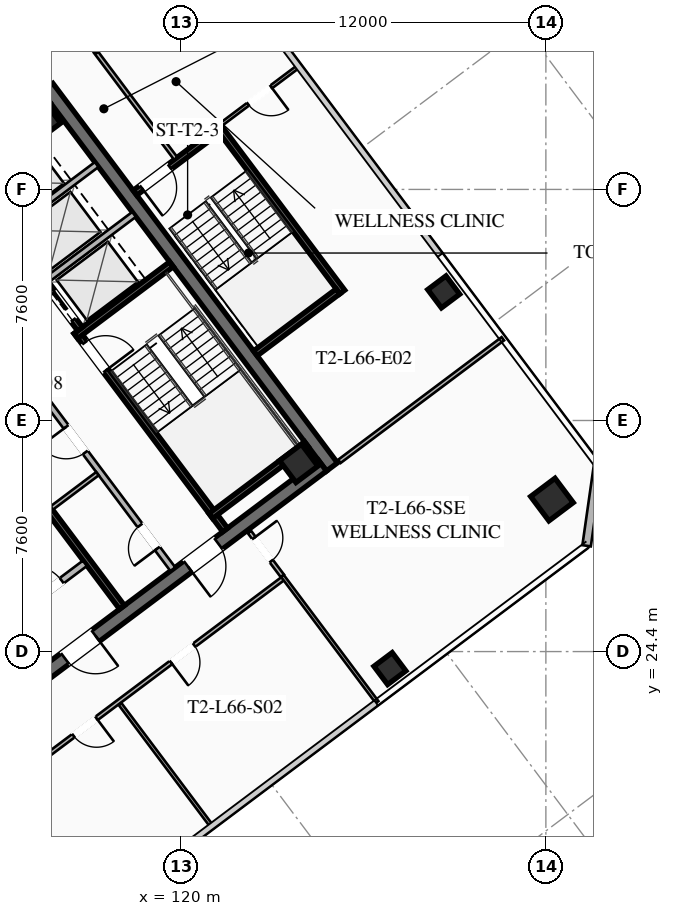
"""IFC4 building model, lengths in metres.
Left out: names, types, materials, properties, quantities, classifications, styles, units other than length and angle.
Written with IfcOpenShell. Run it as: python <this file> out.ifc"""

import sys

from ifc_helpers import new_model, si_unit, direction, frame, frame_2d, origin, origin_2d, place, context, subcontext, project, spatial, rectangle, hollow_rectangle, extrude, element, fill, save


model = new_model("IFC4")
c1 = context("Model", 3, precision=1e-05, world=origin(), true_north=direction((0.0, 1.0)))
c2 = subcontext(c1, "Body", "Model", "MODEL_VIEW")
j1 = project(units=[si_unit("LENGTHUNIT", "METRE"), si_unit("PLANEANGLEUNIT", "RADIAN")], contexts=[c1])
p1 = place(None, origin())
s1 = spatial("IfcSite", under=j1, at=p1, CompositionType="ELEMENT")
p2 = place(p1, origin())
s2 = spatial("IfcBuilding", under=s1, at=p2, CompositionType="ELEMENT")
p3 = place(p2, frame((0.0, 0.0, 243.25)))
s3 = spatial("IfcBuildingStorey", under=s2, at=p3, CompositionType="ELEMENT", Elevation=243.25)
p4 = place(p3, frame((115.604, 42.953, 0.0), z_axis=(0.0, 0.0, 1.0), x_axis=(0.600005007985, -0.799996243986, 0.0)))
e1 = element("IfcWall", 1, at=p4, inside=s3, PredefinedType="SHEAR", context=c2, shape_type="SweptSolid", body=[
    extrude(rectangle(XDim=15.6, YDim=0.45, at=frame_2d((7.8, 0.0))), origin(), (0.0, 0.0, 1.0), 3.55),
])
p5 = place(p3, frame((124.649, 30.518, 0.0), z_axis=(0.0, 0.0, 1.0), x_axis=(-0.8, -0.6, 0.0)))
e2 = element("IfcWall", 2, at=p5, inside=s3, PredefinedType="SHEAR", context=c2, shape_type="SweptSolid", body=[
    extrude(rectangle(XDim=15.26, YDim=0.45, at=frame_2d((7.63, 0.0))), origin(), (0.0, 0.0, 1.0), 3.55),
])
p6 = place(p5, frame((9.33, 0.0, 0.0)))
e3 = element("IfcOpeningElement", 3, at=p6, cuts=e2, PredefinedType="OPENING", context=c2, shape_type="SweptSolid", body=[
    extrude(rectangle(XDim=1.25, YDim=2.25, at=frame_2d((0.625, 1.125))), frame((0.0, 0.235, 0.0), z_axis=(0.0, -1.0, 0.0), x_axis=(1.0, 0.0, 0.0)), (0.0, 0.0, 1.0), 0.47),
])
p7 = place(p5, frame((4.28, 0.0, 0.0)))
e4 = element("IfcOpeningElement", 4, at=p7, cuts=e2, PredefinedType="OPENING", context=c2, shape_type="SweptSolid", body=[
    extrude(rectangle(XDim=1.25, YDim=2.25, at=frame_2d((0.625, 1.125))), frame((0.0, 0.235, 0.0), z_axis=(0.0, -1.0, 0.0), x_axis=(1.0, 0.0, 0.0)), (0.0, 0.0, 1.0), 0.47),
])
for number, where, z_axis, x_axis in (
    (5, (123.87, 30.59, 0.0), (0.0, 0.0, 1.0), (0.8, 0.6, 0.0)),
    (6, (115.41, 41.87, 0.0), (0.0, 0.0, 1.0), (0.8, 0.6, 0.0)),
):
    element("IfcColumn", number, at=place(p3, frame(where, z_axis=z_axis, x_axis=x_axis)), inside=s3, PredefinedType="COLUMN", context=c2, shape_type="SweptSolid", body=[
        extrude(hollow_rectangle(XDim=0.9, YDim=0.9, WallThickness=0.04, at=origin_2d()), origin(), (0.0, 0.0, 1.0), 3.25),
    ])
p8 = place(p3, frame((132.2, 29.4, 0.0), z_axis=(0.0, 0.0, 1.0), x_axis=(0.799999996291, 0.600000004945, 0.0)))
e7 = element("IfcColumn", 7, at=p8, inside=s3, PredefinedType="COLUMN", context=c2, shape_type="SweptSolid", body=[
    extrude(hollow_rectangle(XDim=1.0, YDim=1.0, WallThickness=0.04, at=origin_2d()), origin(), (0.0, 0.0, 1.0), 3.25),
])
for number, where, z_axis, x_axis in (
    (8, (126.87, 23.84, 0.0), (0.0, 0.0, 1.0), (0.8, 0.6, 0.0)),
    (9, (128.64, 36.23, 0.0), (0.0, 0.0, 1.0), (0.8, 0.6, 0.0)),
):
    element("IfcColumn", number, at=place(p3, frame(where, z_axis=z_axis, x_axis=x_axis)), inside=s3, PredefinedType="COLUMN", context=c2, shape_type="SweptSolid", body=[
        extrude(hollow_rectangle(XDim=0.75, YDim=0.75, WallThickness=0.032, at=origin_2d()), origin(), (0.0, 0.0, 1.0), 3.25),
    ])
p9 = place(p3, frame((133.72, 30.54, 0.0), z_axis=(0.0, 0.0, 1.0), x_axis=(-0.141370477216, -0.989956760759, 0.0)))
e10 = element("IfcWall", 10, at=p9, inside=s3, PredefinedType="SOLIDWALL", context=c2, shape_type="SweptSolid", body=[
    extrude(rectangle(XDim=2.687, YDim=0.28, at=frame_2d((1.344, 0.0))), origin(), (0.0, 0.0, 1.0), 3.25),
])
p10 = place(p3, frame((116.56, 34.92, 0.0), z_axis=(0.0, 0.0, 1.0), x_axis=(0.59999041401, -0.800007189403, 0.0)))
e11 = element("IfcWall", 11, at=p10, inside=s3, PredefinedType="SHEAR", context=c2, shape_type="SweptSolid", body=[
    extrude(rectangle(XDim=8.15, YDim=0.2, at=frame_2d((4.075, 0.0))), origin(), (0.0, 0.0, 1.0), 3.25),
])
p11 = place(p10, frame((0.45, 0.0, 0.0)))
e12 = element("IfcOpeningElement", 12, at=p11, cuts=e11, PredefinedType="OPENING", context=c2, shape_type="SweptSolid", body=[
    extrude(rectangle(XDim=1.15, YDim=2.2, at=frame_2d((0.575, 1.1))), frame((0.0, 0.11, 0.0), z_axis=(0.0, -1.0, 0.0), x_axis=(1.0, 0.0, 0.0)), (0.0, 0.0, 1.0), 0.22),
])
for number, where, z_axis, x_axis in (
    (13, (116.54, 34.78, 0.0), (0.0, 0.0, 1.0), (0.8, 0.6, 0.0)),
    (14, (120.98, 28.86, 0.0), (0.0, 0.0, 1.0), (0.8, 0.6, 0.0)),
):
    element("IfcWall", number, at=place(p3, frame(where, z_axis=z_axis, x_axis=x_axis)), inside=s3, PredefinedType="SHEAR", context=c2, shape_type="SweptSolid", body=[
        extrude(rectangle(XDim=3.93, YDim=0.2, at=frame_2d((1.965, 0.0))), origin(), (0.0, 0.0, 1.0), 3.25),
    ])
p12 = place(p3, frame((118.058, 25.856, 0.0), z_axis=(0.0, 0.0, 1.0), x_axis=(-0.600002657301, 0.799998007018, 0.0)))
e15 = element("IfcWall", 15, at=p12, inside=s3, PredefinedType="SHEAR", context=c2, shape_type="SweptSolid", body=[
    extrude(rectangle(XDim=14.7, YDim=0.2, at=frame_2d((7.35, 0.0))), origin(), (0.0, 0.0, 1.0), 3.25),
])
p13 = place(p3, frame((114.316, 25.412, 0.0), z_axis=(0.0, 0.0, 1.0), x_axis=(0.800018601094, 0.59997519774, 0.0)))
e16 = element("IfcWall", 16, at=p13, inside=s3, PredefinedType="SOLIDWALL", context=c2, shape_type="SweptSolid", body=[
    extrude(rectangle(XDim=3.15, YDim=0.22, at=frame_2d((1.575, 0.0))), origin(), (0.0, 0.0, 1.0), 2.393),
])
p14 = place(p13, frame((0.95, 0.0, 0.0)))
e17 = element("IfcOpeningElement", 17, at=p14, cuts=e16, PredefinedType="OPENING", context=c2, shape_type="SweptSolid", body=[
    extrude(rectangle(XDim=1.25, YDim=2.25, at=frame_2d((0.625, 1.125))), frame((0.0, 0.12, 0.0), z_axis=(0.0, -1.0, 0.0), x_axis=(1.0, 0.0, 0.0)), (0.0, 0.0, 1.0), 0.24),
])
p15 = place(p3, frame((112.75, 40.25, 0.0), z_axis=(0.0, 0.0, 1.0), x_axis=(0.599994036198, -0.800004472816, 0.0)))
e18 = element("IfcWall", 18, at=p15, inside=s3, PredefinedType="SHEAR", context=c2, shape_type="SweptSolid", body=[
    extrude(rectangle(XDim=6.55, YDim=0.2, at=frame_2d((3.275, 0.0))), origin(), (0.0, 0.0, 1.0), 3.25),
])
p16 = place(p15, frame((5.075, 0.0, 0.0)))
e19 = element("IfcOpeningElement", 19, at=p16, cuts=e18, PredefinedType="OPENING", context=c2, shape_type="SweptSolid", body=[
    extrude(rectangle(XDim=1.1, YDim=2.2, at=frame_2d((0.55, 1.1))), frame((0.0, 0.11, 0.0), z_axis=(0.0, -1.0, 0.0), x_axis=(1.0, 0.0, 0.0)), (0.0, 0.0, 1.0), 0.22),
])
p17 = place(p15, frame((3.025, 0.0, 0.0)))
e20 = element("IfcOpeningElement", 20, at=p17, cuts=e18, PredefinedType="OPENING", context=c2, shape_type="SweptSolid", body=[
    extrude(rectangle(XDim=1.1, YDim=2.2, at=frame_2d((0.55, 1.1))), frame((0.0, 0.11, 0.0), z_axis=(0.0, -1.0, 0.0), x_axis=(1.0, 0.0, 0.0)), (0.0, 0.0, 1.0), 0.22),
])
p18 = place(p15, frame((1.025, 0.0, 0.0)))
e21 = element("IfcOpeningElement", 21, at=p18, cuts=e18, PredefinedType="OPENING", context=c2, shape_type="SweptSolid", body=[
    extrude(rectangle(XDim=1.1, YDim=2.2, at=frame_2d((0.55, 1.1))), frame((0.0, 0.11, 0.0), z_axis=(0.0, -1.0, 0.0), x_axis=(1.0, 0.0, 0.0)), (0.0, 0.0, 1.0), 0.22),
])
for number, where, z_axis, x_axis in (
    (22, (115.59, 36.63, 0.0), (0.0, 0.0, 1.0), (0.8, 0.6, 0.0)),
    (23, (114.36, 38.27, 0.0), (0.0, 0.0, 1.0), (0.8, 0.6, 0.0)),
):
    element("IfcWall", number, at=place(p3, frame(where, z_axis=z_axis, x_axis=x_axis)), inside=s3, PredefinedType="SOLIDWALL", context=c2, shape_type="SweptSolid", body=[
        extrude(rectangle(XDim=3.58, YDim=0.2, at=frame_2d((1.79, 0.0))), origin(), (0.0, 0.0, 1.0), 3.25),
    ])
p19 = place(p3, frame((119.73, 27.11, 0.0), z_axis=(0.0, 0.0, 1.0), x_axis=(-0.600005580459, 0.799995814625, 0.0)))
e24 = element("IfcWall", 24, at=p19, inside=s3, PredefinedType="SOLIDWALL", context=c2, shape_type="SweptSolid", body=[
    extrude(rectangle(XDim=7.0, YDim=0.2, at=frame_2d((3.5, 0.0))), origin(), (0.0, 0.0, 1.0), 2.393),
])
p20 = place(p19, frame((0.85, 0.0, 0.0)))
e25 = element("IfcOpeningElement", 25, at=p20, cuts=e24, PredefinedType="OPENING", context=c2, shape_type="SweptSolid", body=[
    extrude(rectangle(XDim=0.95, YDim=2.05, at=frame_2d((0.475, 1.025))), frame((0.0, 0.11, 0.0), z_axis=(0.0, -1.0, 0.0), x_axis=(1.0, 0.0, 0.0)), (0.0, 0.0, 1.0), 0.22),
])
p21 = place(p19, frame((4.8, 0.0, 0.0)))
e26 = element("IfcOpeningElement", 26, at=p21, cuts=e24, PredefinedType="OPENING", context=c2, shape_type="SweptSolid", body=[
    extrude(rectangle(XDim=1.05, YDim=2.2, at=frame_2d((0.525, 1.1))), frame((0.0, 0.11, 0.0), z_axis=(0.0, -1.0, 0.0), x_axis=(1.0, 0.0, 0.0)), (0.0, 0.0, 1.0), 0.22),
])
p22 = place(p3, frame((115.746, 29.122, 0.0), z_axis=(0.0, 0.0, 1.0), x_axis=(0.8, 0.6, 0.0)))
e27 = element("IfcWall", 27, at=p22, inside=s3, PredefinedType="PARTITIONING", context=c2, shape_type="SweptSolid", body=[
    extrude(rectangle(XDim=1.88, YDim=0.135, at=frame_2d((0.94, 0.0))), origin(), (0.0, 0.0, 1.0), 2.393),
])
p23 = place(p3, frame((125.304, 36.228, 0.0), z_axis=(0.0, 0.0, 1.0), x_axis=(-0.59998851072, 0.800008616831, 0.0)))
e28 = element("IfcWall", 28, at=p23, inside=s3, PredefinedType="SHEAR", context=c2, shape_type="SweptSolid", body=[
    extrude(rectangle(XDim=6.8, YDim=0.2, at=frame_2d((3.4, 0.0))), origin(), (0.0, 0.0, 1.0), 3.25),
])
p24 = place(p3, frame((121.204, 41.528, 0.0), z_axis=(0.0, 0.0, 1.0), x_axis=(-0.800017232136, -0.599977023131, 0.0)))
e29 = element("IfcWall", 29, at=p24, inside=s3, PredefinedType="SHEAR", context=c2, shape_type="SweptSolid", body=[
    extrude(rectangle(XDim=3.4, YDim=0.2, at=frame_2d((1.7, 0.0))), origin(), (0.0, 0.0, 1.0), 3.25),
])
p25 = place(p24, frame((1.975, 0.0, 0.0)))
e30 = element("IfcOpeningElement", 30, at=p25, cuts=e29, PredefinedType="OPENING", context=c2, shape_type="SweptSolid", body=[
    extrude(rectangle(XDim=1.15, YDim=2.2, at=frame_2d((0.575, 1.1))), frame((0.0, 0.11, 0.0), z_axis=(0.0, -1.0, 0.0), x_axis=(1.0, 0.0, 0.0)), (0.0, 0.0, 1.0), 0.22),
])
p26 = place(p3, frame((122.444, 34.208, 0.0), z_axis=(0.0, 0.0, 1.0), x_axis=(0.79999138319, 0.600011488909, 0.0)))
e31 = element("IfcWall", 31, at=p26, inside=s3, PredefinedType="SHEAR", context=c2, shape_type="SweptSolid", body=[
    extrude(rectangle(XDim=3.4, YDim=0.2, at=frame_2d((1.7, 0.0))), origin(), (0.0, 0.0, 1.0), 3.25),
])
p27 = place(p3, frame((119.824, 40.618, 0.0), z_axis=(0.0, 0.0, 1.0), x_axis=(-0.599982243973, 0.800013316712, 0.0)))
e32 = element("IfcWall", 32, at=p27, inside=s3, PredefinedType="PARTITIONING", context=c2, shape_type="SweptSolid", body=[
    extrude(rectangle(XDim=4.4, YDim=0.135, at=frame_2d((2.2, 0.0))), origin(), (0.0, 0.0, 1.0), 2.393),
])
p28 = place(p3, frame((99.736, 35.052, 0.0), z_axis=(0.0, 0.0, 1.0), x_axis=(0.799997387685, 0.600003483071, 0.0)))
e33 = element("IfcWall", 33, at=p28, inside=s3, PredefinedType="PARTITIONING", context=c2, shape_type="SweptSolid", body=[
    extrude(rectangle(XDim=22.43, YDim=0.135, at=frame_2d((11.215, 0.0))), origin(), (0.0, 0.0, 1.0), 2.393),
])
p29 = place(p28, frame((0.3, 0.0, 0.0)))
e34 = element("IfcOpeningElement", 34, at=p29, cuts=e33, PredefinedType="OPENING", context=c2, shape_type="SweptSolid", body=[
    extrude(rectangle(XDim=0.95, YDim=2.05, at=frame_2d((0.475, 1.025))), frame((0.0, 0.077, 0.0), z_axis=(0.0, -1.0, 0.0), x_axis=(1.0, 0.0, 0.0)), (0.0, 0.0, 1.0), 0.155),
])
p30 = place(p28, frame((9.313, 0.0, 0.0)))
e35 = element("IfcOpeningElement", 35, at=p30, cuts=e33, PredefinedType="OPENING", context=c2, shape_type="SweptSolid", body=[
    extrude(rectangle(XDim=0.95, YDim=2.05, at=frame_2d((0.475, 1.025))), frame((0.0, 0.077, 0.0), z_axis=(0.0, -1.0, 0.0), x_axis=(1.0, 0.0, 0.0)), (0.0, 0.0, 1.0), 0.155),
])
p31 = place(p28, frame((21.18, 0.0, 0.0)))
e36 = element("IfcOpeningElement", 36, at=p31, cuts=e33, PredefinedType="OPENING", context=c2, shape_type="SweptSolid", body=[
    extrude(rectangle(XDim=0.95, YDim=2.05, at=frame_2d((0.475, 1.025))), frame((0.0, 0.077, 0.0), z_axis=(0.0, -1.0, 0.0), x_axis=(1.0, 0.0, 0.0)), (0.0, 0.0, 1.0), 0.155),
])
p32 = place(p3, frame((123.382, 26.824, 0.0), z_axis=(0.0, 0.0, 1.0), x_axis=(-0.800004191227, -0.599994411657, 0.0)))
e37 = element("IfcWall", 37, at=p32, inside=s3, PredefinedType="PARTITIONING", context=c2, shape_type="SweptSolid", body=[
    extrude(rectangle(XDim=13.98, YDim=0.135, at=frame_2d((6.99, 0.0))), origin(), (0.0, 0.0, 1.0), 2.393),
])
p33 = place(p32, frame((7.701, 0.0, 0.0)))
e38 = element("IfcOpeningElement", 38, at=p33, cuts=e37, PredefinedType="OPENING", context=c2, shape_type="SweptSolid", body=[
    extrude(rectangle(XDim=0.95, YDim=2.05, at=frame_2d((0.475, 1.025))), frame((0.0, 0.077, 0.0), z_axis=(0.0, -1.0, 0.0), x_axis=(1.0, 0.0, 0.0)), (0.0, 0.0, 1.0), 0.155),
])
p34 = place(p32, frame((3.688, 0.0, 0.0)))
e39 = element("IfcOpeningElement", 39, at=p34, cuts=e37, PredefinedType="OPENING", context=c2, shape_type="SweptSolid", body=[
    extrude(rectangle(XDim=0.95, YDim=2.05, at=frame_2d((0.475, 1.025))), frame((0.0, 0.077, 0.0), z_axis=(0.0, -1.0, 0.0), x_axis=(1.0, 0.0, 0.0)), (0.0, 0.0, 1.0), 0.155),
])
p35 = place(p3, frame((122.248, 28.336, 0.0), z_axis=(0.0, 0.0, 1.0), x_axis=(0.599978417824, -0.800016186177, 0.0)))
e40 = element("IfcWall", 40, at=p35, inside=s3, PredefinedType="PARTITIONING", context=c2, shape_type="SweptSolid", body=[
    extrude(rectangle(XDim=1.81, YDim=0.135, at=frame_2d((0.905, 0.0))), origin(), (0.0, 0.0, 1.0), 2.393),
])
p36 = place(p35, frame((0.25, 0.0, 0.0)))
e41 = element("IfcOpeningElement", 41, at=p36, cuts=e40, PredefinedType="OPENING", context=c2, shape_type="SweptSolid", body=[
    extrude(rectangle(XDim=0.95, YDim=2.05, at=frame_2d((0.475, 1.025))), frame((0.0, 0.077, 0.0), z_axis=(0.0, -1.0, 0.0), x_axis=(1.0, 0.0, 0.0)), (0.0, 0.0, 1.0), 0.155),
])
p37 = place(p3, frame((121.008, 18.656, 0.0), z_axis=(0.0, 0.0, 1.0), x_axis=(-0.600015531756, 0.799988350947, 0.0)))
e42 = element("IfcWall", 42, at=p37, inside=s3, PredefinedType="PARTITIONING", context=c2, shape_type="SweptSolid", body=[
    extrude(rectangle(XDim=5.03, YDim=0.11, at=frame_2d((2.515, 0.0))), origin(), (0.0, 0.0, 1.0), 2.393),
])
p38 = place(p3, frame((126.448, 22.736, 0.0), z_axis=(0.0, 0.0, 1.0), x_axis=(-0.600015053192, 0.799988709885, 0.0)))
e43 = element("IfcWall", 43, at=p38, inside=s3, PredefinedType="PARTITIONING", context=c2, shape_type="SweptSolid", body=[
    extrude(rectangle(XDim=5.19, YDim=0.11, at=frame_2d((2.595, 0.0))), origin(), (0.0, 0.0, 1.0), 2.393),
])
p39 = place(p3, frame((121.224, 47.168, 0.0), z_axis=(0.0, 0.0, 1.0), x_axis=(-0.8, -0.6, 0.0)))
e44 = element("IfcWall", 44, at=p39, inside=s3, PredefinedType="PARTITIONING", context=c2, shape_type="SweptSolid", body=[
    extrude(rectangle(XDim=5.05, YDim=0.135, at=frame_2d((2.525, 0.0))), origin(), (0.0, 0.0, 1.0), 2.393),
])
p40 = place(p39, frame((2.4, 0.0, 0.0)))
e45 = element("IfcOpeningElement", 45, at=p40, cuts=e44, PredefinedType="OPENING", context=c2, shape_type="SweptSolid", body=[
    extrude(rectangle(XDim=0.95, YDim=2.05, at=frame_2d((0.475, 1.025))), frame((0.0, 0.077, 0.0), z_axis=(0.0, -1.0, 0.0), x_axis=(1.0, 0.0, 0.0)), (0.0, 0.0, 1.0), 0.155),
])
p41 = place(p3, frame((125.208, 30.656, 0.0), z_axis=(0.0, 0.0, 1.0), x_axis=(0.8, 0.6, 0.0)))
e46 = element("IfcWall", 46, at=p41, inside=s3, PredefinedType="PARTITIONING", context=c2, shape_type="SweptSolid", body=[
    extrude(rectangle(XDim=6.72, YDim=0.135, at=frame_2d((3.36, 0.0))), origin(), (0.0, 0.0, 1.0), 2.393),
])
p42 = place(p3, frame((123.864, 43.648, 0.0), z_axis=(0.0, 0.0, 1.0), x_axis=(-0.800018310174, -0.599975585658, 0.0)))
e47 = element("IfcWall", 47, at=p42, inside=s3, PredefinedType="PARTITIONING", context=c2, shape_type="SweptSolid", body=[
    extrude(rectangle(XDim=3.2, YDim=0.11, at=frame_2d((1.6, 0.0))), origin(), (0.0, 0.0, 1.0), 2.393),
])
p43 = place(p42, frame((1.125, 0.0, 0.0)))
e48 = element("IfcOpeningElement", 48, at=p43, cuts=e47, PredefinedType="OPENING", context=c2, shape_type="SweptSolid", body=[
    extrude(rectangle(XDim=0.95, YDim=2.05, at=frame_2d((0.475, 1.025))), frame((0.0, 0.065, 0.0), z_axis=(0.0, -1.0, 0.0), x_axis=(1.0, 0.0, 0.0)), (0.0, 0.0, 1.0), 0.13),
])
p44 = place(p6, origin())
e49 = element("IfcDoor", 49, at=p44, inside=s3, OperationType="SINGLE_SWING_LEFT", PredefinedType="DOOR", context=c2, shape_type="SweptSolid", body=[
    extrude(rectangle(XDim=1.25, YDim=2.25, at=frame_2d((0.625, 1.125))), frame((0.0, 0.025, 0.0), z_axis=(0.0, -1.0, 0.0), x_axis=(1.0, 0.0, 0.0)), (0.0, 0.0, 1.0), 0.05),
])
fill(e3, e49)
p45 = place(p7, origin())
e50 = element("IfcDoor", 50, at=p45, inside=s3, OperationType="SINGLE_SWING_RIGHT", PredefinedType="DOOR", context=c2, shape_type="SweptSolid", body=[
    extrude(rectangle(XDim=1.25, YDim=2.25, at=frame_2d((0.625, 1.125))), frame((0.0, 0.025, 0.0), z_axis=(0.0, -1.0, 0.0), x_axis=(1.0, 0.0, 0.0)), (0.0, 0.0, 1.0), 0.05),
])
fill(e4, e50)
p46 = place(p11, origin())
e51 = element("IfcDoor", 51, at=p46, inside=s3, OperationType="SINGLE_SWING_RIGHT", PredefinedType="DOOR", context=c2, shape_type="SweptSolid", body=[
    extrude(rectangle(XDim=1.15, YDim=2.2, at=frame_2d((0.575, 1.1))), frame((0.0, 0.025, 0.0), z_axis=(0.0, -1.0, 0.0), x_axis=(1.0, 0.0, 0.0)), (0.0, 0.0, 1.0), 0.05),
])
fill(e12, e51)
p47 = place(p14, origin())
e52 = element("IfcDoor", 52, at=p47, inside=s3, OperationType="SINGLE_SWING_LEFT", PredefinedType="DOOR", context=c2, shape_type="SweptSolid", body=[
    extrude(rectangle(XDim=1.25, YDim=2.25, at=frame_2d((0.625, 1.125))), frame((0.0, 0.025, 0.0), z_axis=(0.0, -1.0, 0.0), x_axis=(1.0, 0.0, 0.0)), (0.0, 0.0, 1.0), 0.05),
])
fill(e17, e52)
p48 = place(p20, origin())
e53 = element("IfcDoor", 53, at=p48, inside=s3, OperationType="SINGLE_SWING_LEFT", PredefinedType="DOOR", context=c2, shape_type="SweptSolid", body=[
    extrude(rectangle(XDim=0.95, YDim=2.05, at=frame_2d((0.475, 1.025))), frame((0.0, 0.025, 0.0), z_axis=(0.0, -1.0, 0.0), x_axis=(1.0, 0.0, 0.0)), (0.0, 0.0, 1.0), 0.05),
])
fill(e25, e53)
p49 = place(p21, origin())
e54 = element("IfcDoor", 54, at=p49, inside=s3, OperationType="SINGLE_SWING_RIGHT", PredefinedType="DOOR", context=c2, shape_type="SweptSolid", body=[
    extrude(rectangle(XDim=1.05, YDim=2.2, at=frame_2d((0.525, 1.1))), frame((0.0, 0.025, 0.0), z_axis=(0.0, -1.0, 0.0), x_axis=(1.0, 0.0, 0.0)), (0.0, 0.0, 1.0), 0.05),
])
fill(e26, e54)
p50 = place(p25, origin())
e55 = element("IfcDoor", 55, at=p50, inside=s3, OperationType="SINGLE_SWING_RIGHT", PredefinedType="DOOR", context=c2, shape_type="SweptSolid", body=[
    extrude(rectangle(XDim=1.15, YDim=2.2, at=frame_2d((0.575, 1.1))), frame((0.0, 0.025, 0.0), z_axis=(0.0, -1.0, 0.0), x_axis=(1.0, 0.0, 0.0)), (0.0, 0.0, 1.0), 0.05),
])
fill(e30, e55)
p51 = place(p33, origin())
e56 = element("IfcDoor", 56, at=p51, inside=s3, OperationType="SINGLE_SWING_LEFT", PredefinedType="DOOR", context=c2, shape_type="SweptSolid", body=[
    extrude(rectangle(XDim=0.95, YDim=2.05, at=frame_2d((0.475, 1.025))), frame((0.0, 0.025, 0.0), z_axis=(0.0, -1.0, 0.0), x_axis=(1.0, 0.0, 0.0)), (0.0, 0.0, 1.0), 0.05),
])
fill(e38, e56)
p52 = place(p34, origin())
e57 = element("IfcDoor", 57, at=p52, inside=s3, OperationType="SINGLE_SWING_RIGHT", PredefinedType="DOOR", context=c2, shape_type="SweptSolid", body=[
    extrude(rectangle(XDim=0.95, YDim=2.05, at=frame_2d((0.475, 1.025))), frame((0.0, 0.025, 0.0), z_axis=(0.0, -1.0, 0.0), x_axis=(1.0, 0.0, 0.0)), (0.0, 0.0, 1.0), 0.05),
])
fill(e39, e57)
p53 = place(p36, origin())
e58 = element("IfcDoor", 58, at=p53, inside=s3, OperationType="SINGLE_SWING_LEFT", PredefinedType="DOOR", context=c2, shape_type="SweptSolid", body=[
    extrude(rectangle(XDim=0.95, YDim=2.05, at=frame_2d((0.475, 1.025))), frame((0.0, 0.025, 0.0), z_axis=(0.0, -1.0, 0.0), x_axis=(1.0, 0.0, 0.0)), (0.0, 0.0, 1.0), 0.05),
])
fill(e41, e58)
p54 = place(p43, origin())
e59 = element("IfcDoor", 59, at=p54, inside=s3, OperationType="SINGLE_SWING_LEFT", PredefinedType="DOOR", context=c2, shape_type="SweptSolid", body=[
    extrude(rectangle(XDim=0.95, YDim=2.05, at=frame_2d((0.475, 1.025))), frame((0.0, 0.025, 0.0), z_axis=(0.0, -1.0, 0.0), x_axis=(1.0, 0.0, 0.0)), (0.0, 0.0, 1.0), 0.05),
])
fill(e48, e59)
p55 = place(p16, origin())
e60 = element("IfcDoor", 60, at=p55, inside=s3, OperationType="SLIDING_TO_LEFT", PredefinedType="DOOR", context=c2, shape_type="SweptSolid", body=[
    extrude(rectangle(XDim=1.1, YDim=2.2, at=frame_2d((0.55, 1.1))), frame((0.0, 0.025, 0.0), z_axis=(0.0, -1.0, 0.0), x_axis=(1.0, 0.0, 0.0)), (0.0, 0.0, 1.0), 0.05),
])
fill(e19, e60)
save(model, sys.argv[1])
